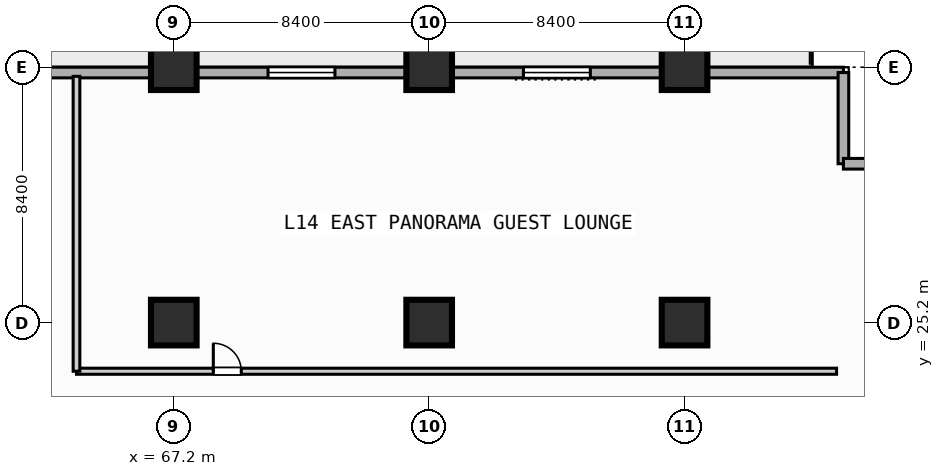
"""IFC4 building model, lengths in metres.
Left out: names, types, materials, properties, quantities, classifications, styles, units other than length and angle.
Written with IfcOpenShell. Run it as: python <this file> out.ifc"""

import sys

from ifc_helpers import new_model, si_unit, direction, frame, frame_2d, origin, origin_2d, place, context, subcontext, project, spatial, rectangle, extrude, element, fill, save


model = new_model("IFC4")
c1 = context("Model", 3, precision=1e-05, world=origin(), true_north=direction((0.0, 1.0)))
c2 = subcontext(c1, "Body", "Model", "MODEL_VIEW")
j1 = project(units=[si_unit("LENGTHUNIT", "METRE"), si_unit("PLANEANGLEUNIT", "RADIAN")], contexts=[c1])
p1 = place(None, origin())
s1 = spatial("IfcSite", under=j1, at=p1, CompositionType="ELEMENT")
p2 = place(p1, origin())
s2 = spatial("IfcBuilding", under=s1, at=p2, CompositionType="ELEMENT")
p3 = place(p2, frame((0.0, 0.0, 62.4)))
s3 = spatial("IfcBuildingStorey", under=s2, at=p3, CompositionType="ELEMENT", Elevation=62.4)
for number, where, z_axis, x_axis in (
    (1, (67.2, 25.2, 0.0), (0.0, 0.0, 1.0), (1.0, 0.0, 0.0)),
    (2, (67.2, 33.6, 0.0), (0.0, 0.0, 1.0), (1.0, 0.0, 0.0)),
    (3, (75.6, 25.2, 0.0), (0.0, 0.0, 1.0), (1.0, 0.0, 0.0)),
    (4, (75.6, 33.6, 0.0), (0.0, 0.0, 1.0), (1.0, 0.0, 0.0)),
    (5, (84.0, 25.2, 0.0), (0.0, 0.0, 1.0), (1.0, 0.0, 0.0)),
    (6, (84.0, 33.6, 0.0), (0.0, 0.0, 1.0), (1.0, 0.0, 0.0)),
):
    element("IfcColumn", number, at=place(p3, frame(where, z_axis=z_axis, x_axis=x_axis)), inside=s3, PredefinedType="COLUMN", context=c2, shape_type="SweptSolid", body=[
        extrude(rectangle(XDim=1.5, YDim=1.5, at=origin_2d()), origin(), (0.0, 0.0, 1.0), 3.8),
    ])
p4 = place(p3, frame((33.425, 33.425, 0.0), z_axis=(0.0, 0.0, 1.0), x_axis=(1.0, 0.0, 0.0)))
e7 = element("IfcWall", 7, at=p4, inside=s3, PredefinedType="STANDARD", context=c2, shape_type="SweptSolid", body=[
    extrude(rectangle(XDim=55.8, YDim=0.35, at=frame_2d((27.9, 0.0))), origin(), (0.0, 0.0, 1.0), 3.55),
])
p5 = place(p4, frame((12.075, 0.0, 0.0)))
e8 = element("IfcOpeningElement", 8, at=p5, cuts=e7, PredefinedType="OPENING", context=c2, shape_type="SweptSolid", body=[
    extrude(rectangle(XDim=1.4, YDim=2.2, at=frame_2d((0.7, 1.1))), frame((0.0, 0.185, 0.0), z_axis=(0.0, -1.0, 0.0), x_axis=(1.0, 0.0, 0.0)), (0.0, 0.0, 1.0), 0.37),
])
p6 = place(p4, frame((36.875, 0.0, 0.85)))
e9 = element("IfcOpeningElement", 9, at=p6, cuts=e7, PredefinedType="OPENING", context=c2, shape_type="SweptSolid", body=[
    extrude(rectangle(XDim=2.2, YDim=1.8, at=frame_2d((1.1, 0.9))), frame((0.0, 0.185, 0.0), z_axis=(0.0, -1.0, 0.0), x_axis=(1.0, 0.0, 0.0)), (0.0, 0.0, 1.0), 0.37),
])
p7 = place(p4, frame((45.275, 0.0, 0.85)))
e10 = element("IfcOpeningElement", 10, at=p7, cuts=e7, PredefinedType="OPENING", context=c2, shape_type="SweptSolid", body=[
    extrude(rectangle(XDim=2.2, YDim=1.8, at=frame_2d((1.1, 0.9))), frame((0.0, 0.185, 0.0), z_axis=(0.0, -1.0, 0.0), x_axis=(1.0, 0.0, 0.0)), (0.0, 0.0, 1.0), 0.37),
])
for number, where, z_axis, x_axis in (
    (11, (89.225, 33.425, 0.0), (0.0, 0.0, 1.0), (0.0, -1.0, 0.0)),
    (12, (89.225, 30.425, 0.0), (0.0, 0.0, 1.0), (1.0, 0.0, 0.0)),
):
    element("IfcWall", number, at=place(p3, frame(where, z_axis=z_axis, x_axis=x_axis)), inside=s3, PredefinedType="STANDARD", context=c2, shape_type="SweptSolid", body=[
        extrude(rectangle(XDim=3.0, YDim=0.35, at=frame_2d((1.5, 0.0))), origin(), (0.0, 0.0, 1.0), 3.55),
    ])
p8 = place(p3, frame((64.0, 23.6, 0.0), z_axis=(0.0, 0.0, 1.0), x_axis=(1.0, 0.0, 0.0)))
e13 = element("IfcWall", 13, at=p8, inside=s3, PredefinedType="PARTITIONING", context=c2, shape_type="SweptSolid", body=[
    extrude(rectangle(XDim=25.0, YDim=0.2, at=frame_2d((12.5, 0.0))), origin(), (0.0, 0.0, 1.0), 3.55),
])
p9 = place(p8, frame((4.5, 0.0, 0.0)))
e14 = element("IfcOpeningElement", 14, at=p9, cuts=e13, PredefinedType="OPENING", context=c2, shape_type="SweptSolid", body=[
    extrude(rectangle(XDim=0.92, YDim=2.1, at=frame_2d((0.46, 1.05))), frame((0.0, 0.11, 0.0), z_axis=(0.0, -1.0, 0.0), x_axis=(1.0, 0.0, 0.0)), (0.0, 0.0, 1.0), 0.22),
])
p10 = place(p3, frame((64.0, 23.6, 0.0), z_axis=(0.0, 0.0, 1.0), x_axis=(0.0, 1.0, 0.0)))
e15 = element("IfcWall", 15, at=p10, inside=s3, PredefinedType="PARTITIONING", context=c2, shape_type="SweptSolid", body=[
    extrude(rectangle(XDim=9.7, YDim=0.22, at=frame_2d((4.85, 0.0))), origin(), (0.0, 0.0, 1.0), 3.55),
])
p11 = place(p6, origin())
e16 = element("IfcWindow", 16, at=p11, inside=s3, PartitioningType="SINGLE_PANEL", PredefinedType="WINDOW", context=c2, shape_type="SweptSolid", body=[
    extrude(rectangle(XDim=2.2, YDim=1.8, at=frame_2d((1.1, 0.9))), frame((0.0, 0.03, 0.0), z_axis=(0.0, -1.0, 0.0), x_axis=(1.0, 0.0, 0.0)), (0.0, 0.0, 1.0), 0.06),
])
fill(e9, e16)
p12 = place(p7, origin())
e17 = element("IfcWindow", 17, at=p12, inside=s3, PartitioningType="SINGLE_PANEL", PredefinedType="WINDOW", context=c2, shape_type="SweptSolid", body=[
    extrude(rectangle(XDim=2.2, YDim=1.8, at=frame_2d((1.1, 0.9))), frame((0.0, 0.03, 0.0), z_axis=(0.0, -1.0, 0.0), x_axis=(1.0, 0.0, 0.0)), (0.0, 0.0, 1.0), 0.06),
])
fill(e10, e17)
p13 = place(p9, origin())
e18 = element("IfcDoor", 18, at=p13, inside=s3, OperationType="SINGLE_SWING_LEFT", PredefinedType="DOOR", context=c2, shape_type="SweptSolid", body=[
    extrude(rectangle(XDim=0.92, YDim=2.1, at=frame_2d((0.46, 1.05))), frame((0.0, 0.025, 0.0), z_axis=(0.0, -1.0, 0.0), x_axis=(1.0, 0.0, 0.0)), (0.0, 0.0, 1.0), 0.05),
])
fill(e14, e18)
save(model, sys.argv[1])
